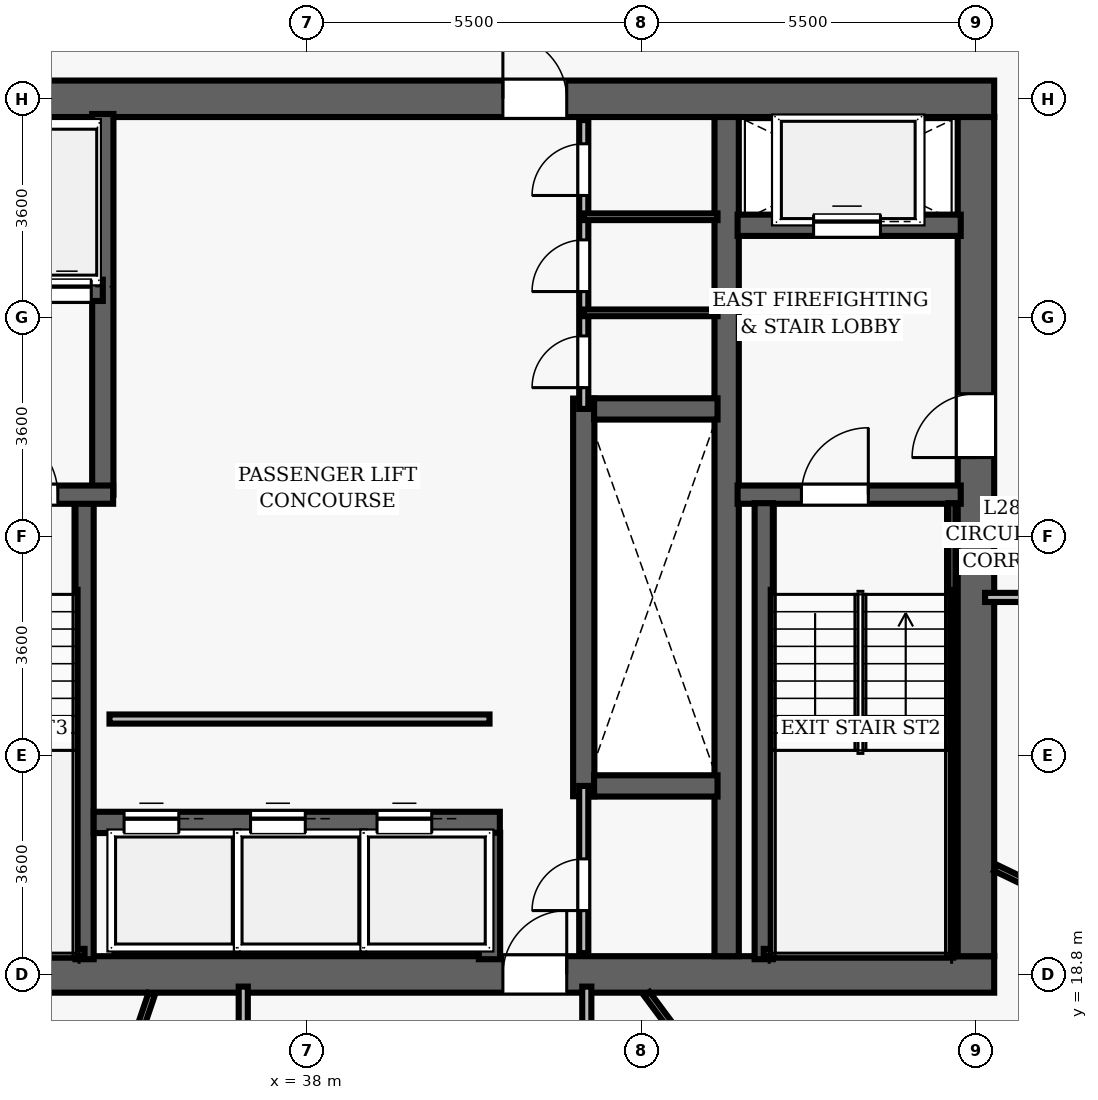
"""IFC4 building model, lengths in metres.
Left out: names, types, materials, properties, quantities, classifications, styles, units other than length and angle.
Written with IfcOpenShell. Run it as: python <this file> out.ifc"""

import sys

from ifc_helpers import new_model, si_unit, direction, frame, frame_2d, origin, place, context, subcontext, project, spatial, rectangle, extrude, element, fill, save


model = new_model("IFC4")
c1 = context("Model", 3, precision=1e-05, world=origin(), true_north=direction((0.0, 1.0)))
c2 = subcontext(c1, "Body", "Model", "MODEL_VIEW")
j1 = project(units=[si_unit("LENGTHUNIT", "METRE"), si_unit("PLANEANGLEUNIT", "RADIAN")], contexts=[c1])
p1 = place(None, origin())
s1 = spatial("IfcSite", under=j1, at=p1, CompositionType="ELEMENT")
p2 = place(p1, origin())
s2 = spatial("IfcBuilding", under=s1, at=p2, CompositionType="ELEMENT")
p3 = place(p2, frame((0.0, 0.0, 116.8)))
s3 = spatial("IfcBuildingStorey", under=s2, at=p3, CompositionType="ELEMENT", Elevation=116.8)
p4 = place(p3, frame((26.7, 18.8, 0.0), z_axis=(0.0, 0.0, 1.0), x_axis=(1.0, 0.0, 0.0)))
e1 = element("IfcWall", 1, at=p4, inside=s3, PredefinedType="SHEAR", context=c2, shape_type="SweptSolid", body=[
    extrude(rectangle(XDim=22.6, YDim=0.6, at=frame_2d((11.3, 0.0))), origin(), (0.0, 0.0, 1.0), 3.5),
])
p5 = place(p4, frame((14.52, 0.0, 0.0)))
e2 = element("IfcOpeningElement", 2, at=p5, cuts=e1, PredefinedType="OPENING", context=c2, shape_type="SweptSolid", body=[
    extrude(rectangle(XDim=1.05, YDim=2.15, at=frame_2d((0.525, 1.075))), frame((0.0, 0.31, 0.0), z_axis=(0.0, -1.0, 0.0), x_axis=(1.0, 0.0, 0.0)), (0.0, 0.0, 1.0), 0.62),
])
p6 = place(p3, frame((26.7, 33.2, 0.0), z_axis=(0.0, 0.0, 1.0), x_axis=(1.0, 0.0, 0.0)))
e3 = element("IfcWall", 3, at=p6, inside=s3, PredefinedType="SHEAR", context=c2, shape_type="SweptSolid", body=[
    extrude(rectangle(XDim=22.6, YDim=0.6, at=frame_2d((11.3, 0.0))), origin(), (0.0, 0.0, 1.0), 3.5),
])
p7 = place(p6, frame((4.62, 0.0, 0.0)))
e4 = element("IfcOpeningElement", 4, at=p7, cuts=e3, PredefinedType="OPENING", context=c2, shape_type="SweptSolid", body=[
    extrude(rectangle(XDim=1.05, YDim=2.15, at=frame_2d((0.525, 1.075))), frame((0.0, 0.31, 0.0), z_axis=(0.0, -1.0, 0.0), x_axis=(1.0, 0.0, 0.0)), (0.0, 0.0, 1.0), 0.62),
])
p8 = place(p6, frame((14.52, 0.0, 0.0)))
e5 = element("IfcOpeningElement", 5, at=p8, cuts=e3, PredefinedType="OPENING", context=c2, shape_type="SweptSolid", body=[
    extrude(rectangle(XDim=1.05, YDim=2.15, at=frame_2d((0.525, 1.075))), frame((0.0, 0.31, 0.0), z_axis=(0.0, -1.0, 0.0), x_axis=(1.0, 0.0, 0.0)), (0.0, 0.0, 1.0), 0.62),
])
p9 = place(p3, frame((49.0, 19.1, 0.0), z_axis=(0.0, 0.0, 1.0), x_axis=(0.0, 1.0, 0.0)))
e6 = element("IfcWall", 6, at=p9, inside=s3, PredefinedType="SHEAR", context=c2, shape_type="SweptSolid", body=[
    extrude(rectangle(XDim=13.8, YDim=0.6, at=frame_2d((6.9, 0.0))), origin(), (0.0, 0.0, 1.0), 3.5),
])
p10 = place(p9, frame((8.2, 0.0, 0.0)))
e7 = element("IfcOpeningElement", 7, at=p10, cuts=e6, PredefinedType="OPENING", context=c2, shape_type="SweptSolid", body=[
    extrude(rectangle(XDim=1.05, YDim=2.15, at=frame_2d((0.525, 1.075))), frame((0.0, 0.31, 0.0), z_axis=(0.0, -1.0, 0.0), x_axis=(1.0, 0.0, 0.0)), (0.0, 0.0, 1.0), 0.62),
])
p11 = place(p3, frame((44.9, 19.1, 0.0), z_axis=(0.0, 0.0, 1.0), x_axis=(0.0, 1.0, 0.0)))
e8 = element("IfcWall", 8, at=p11, inside=s3, PredefinedType="SHEAR", context=c2, shape_type="SweptSolid", body=[
    extrude(rectangle(XDim=13.8, YDim=0.4, at=frame_2d((6.9, 0.0))), origin(), (0.0, 0.0, 1.0), 3.5),
])
p12 = place(p3, frame((45.08, 26.69, 0.0), z_axis=(0.0, 0.0, 1.0), x_axis=(1.0, 0.0, 0.0)))
e9 = element("IfcWall", 9, at=p12, inside=s3, PredefinedType="SHEAR", context=c2, shape_type="SweptSolid", body=[
    extrude(rectangle(XDim=3.67, YDim=0.3, at=frame_2d((1.835, 0.0))), origin(), (0.0, 0.0, 1.0), 3.5),
])
p13 = place(p12, frame((1.05, 0.0, 0.0)))
e10 = element("IfcOpeningElement", 10, at=p13, cuts=e9, PredefinedType="OPENING", context=c2, shape_type="SweptSolid", body=[
    extrude(rectangle(XDim=1.1, YDim=2.15, at=frame_2d((0.55, 1.075))), frame((0.0, 0.16, 0.0), z_axis=(0.0, -1.0, 0.0), x_axis=(1.0, 0.0, 0.0)), (0.0, 0.0, 1.0), 0.32),
])
p14 = place(p3, frame((45.51, 19.05, 0.0), z_axis=(0.0, 0.0, 1.0), x_axis=(0.0, 1.0, 0.0)))
e11 = element("IfcWall", 11, at=p14, inside=s3, PredefinedType="SHEAR", context=c2, shape_type="SweptSolid", body=[
    extrude(rectangle(XDim=7.5, YDim=0.3, at=frame_2d((3.75, 0.0))), origin(), (0.0, 0.0, 1.0), 3.5),
])
p15 = place(p3, frame((48.605, 19.1, 0.0), z_axis=(0.0, 0.0, 1.0), x_axis=(0.0, 1.0, 0.0)))
e12 = element("IfcWall", 12, at=p15, inside=s3, PredefinedType="SHEAR", context=c2, shape_type="SweptSolid", body=[
    extrude(rectangle(XDim=7.45, YDim=0.12, at=frame_2d((3.725, 0.0))), origin(), (0.0, 0.0, 1.0), 3.5),
])
p16 = place(p3, frame((45.51, 19.16, 0.0), z_axis=(0.0, 0.0, 1.0), x_axis=(1.0, 0.0, 0.0)))
e13 = element("IfcWall", 13, at=p16, inside=s3, PredefinedType="SHEAR", context=c2, shape_type="SweptSolid", body=[
    extrude(rectangle(XDim=3.095, YDim=0.12, at=frame_2d((1.547, 0.0))), origin(), (0.0, 0.0, 1.0), 3.5),
])
p17 = place(p3, frame((45.08, 31.12, 0.0), z_axis=(0.0, 0.0, 1.0), x_axis=(1.0, 0.0, 0.0)))
e14 = element("IfcWall", 14, at=p17, inside=s3, PredefinedType="SHEAR", context=c2, shape_type="SweptSolid", body=[
    extrude(rectangle(XDim=3.67, YDim=0.35, at=frame_2d((1.835, 0.0))), origin(), (0.0, 0.0, 1.0), 2.675),
])
p18 = place(p17, frame((1.25, 0.0, 0.0)))
e15 = element("IfcOpeningElement", 15, at=p18, cuts=e14, PredefinedType="OPENING", context=c2, shape_type="SweptSolid", body=[
    extrude(rectangle(XDim=1.1, YDim=2.15, at=frame_2d((0.55, 1.075))), frame((0.0, 0.185, 0.0), z_axis=(0.0, -1.0, 0.0), x_axis=(1.0, 0.0, 0.0)), (0.0, 0.0, 1.0), 0.37),
])
p19 = place(p3, frame((34.34, 19.05, 0.0), z_axis=(0.0, 0.0, 1.0), x_axis=(0.0, 1.0, 0.0)))
e16 = element("IfcWall", 16, at=p19, inside=s3, PredefinedType="SHEAR", context=c2, shape_type="SweptSolid", body=[
    extrude(rectangle(XDim=7.5, YDim=0.3, at=frame_2d((3.75, 0.0))), origin(), (0.0, 0.0, 1.0), 3.5),
])
p20 = place(p3, frame((34.64, 26.69, 0.0), z_axis=(0.0, 0.0, 1.0), x_axis=(0.0, 1.0, 0.0)))
e17 = element("IfcWall", 17, at=p20, inside=s3, PredefinedType="SHEAR", context=c2, shape_type="SweptSolid", body=[
    extrude(rectangle(XDim=6.26, YDim=0.35, at=frame_2d((3.13, 0.0))), origin(), (0.0, 0.0, 1.0), 3.5),
])
p21 = place(p3, frame((31.25, 26.69, 0.0), z_axis=(0.0, 0.0, 1.0), x_axis=(1.0, 0.0, 0.0)))
e18 = element("IfcWall", 18, at=p21, inside=s3, PredefinedType="SHEAR", context=c2, shape_type="SweptSolid", body=[
    extrude(rectangle(XDim=3.56, YDim=0.3, at=frame_2d((1.78, 0.0))), origin(), (0.0, 0.0, 1.0), 3.5),
])
p22 = place(p21, frame((1.55, 0.0, 0.0)))
e19 = element("IfcOpeningElement", 19, at=p22, cuts=e18, PredefinedType="OPENING", context=c2, shape_type="SweptSolid", body=[
    extrude(rectangle(XDim=1.1, YDim=2.15, at=frame_2d((0.55, 1.075))), frame((0.0, 0.16, 0.0), z_axis=(0.0, -1.0, 0.0), x_axis=(1.0, 0.0, 0.0)), (0.0, 0.0, 1.0), 0.32),
])
p23 = place(p3, frame((31.3, 19.16, 0.0), z_axis=(0.0, 0.0, 1.0), x_axis=(1.0, 0.0, 0.0)))
e20 = element("IfcWall", 20, at=p23, inside=s3, PredefinedType="SHEAR", context=c2, shape_type="SweptSolid", body=[
    extrude(rectangle(XDim=3.04, YDim=0.12, at=frame_2d((1.52, 0.0))), origin(), (0.0, 0.0, 1.0), 3.5),
])
p24 = place(p3, frame((32.23, 30.05, 0.0), z_axis=(0.0, 0.0, 1.0), x_axis=(1.0, 0.0, 0.0)))
e21 = element("IfcWall", 21, at=p24, inside=s3, PredefinedType="SHEAR", context=c2, shape_type="SweptSolid", body=[
    extrude(rectangle(XDim=2.41, YDim=0.35, at=frame_2d((1.205, 0.0))), origin(), (0.0, 0.0, 1.0), 2.675),
])
p25 = place(p24, frame((0.42, 0.0, 0.0)))
e22 = element("IfcOpeningElement", 22, at=p25, cuts=e21, PredefinedType="OPENING", context=c2, shape_type="SweptSolid", body=[
    extrude(rectangle(XDim=0.8, YDim=2.15, at=frame_2d((0.4, 1.075))), frame((0.0, 0.185, 0.0), z_axis=(0.0, -1.0, 0.0), x_axis=(1.0, 0.0, 0.0)), (0.0, 0.0, 1.0), 0.37),
])
p26 = place(p24, frame((1.42, 0.0, 0.0)))
e23 = element("IfcOpeningElement", 23, at=p26, cuts=e21, PredefinedType="OPENING", context=c2, shape_type="SweptSolid", body=[
    extrude(rectangle(XDim=0.8, YDim=2.15, at=frame_2d((0.4, 1.075))), frame((0.0, 0.185, 0.0), z_axis=(0.0, -1.0, 0.0), x_axis=(1.0, 0.0, 0.0)), (0.0, 0.0, 1.0), 0.37),
])
p27 = place(p3, frame((42.55, 21.73, 0.0), z_axis=(0.0, 0.0, 1.0), x_axis=(0.0, 1.0, 0.0)))
e24 = element("IfcWall", 24, at=p27, inside=s3, PredefinedType="SHEAR", context=c2, shape_type="SweptSolid", body=[
    extrude(rectangle(XDim=6.54, YDim=0.35, at=frame_2d((3.27, 0.0))), origin(), (0.0, 0.0, 1.0), 2.675),
])
for number, where, z_axis, x_axis in (
    (25, (42.72, 21.9, 0.0), (0.0, 0.0, 1.0), (1.0, 0.0, 0.0)),
    (26, (42.72, 28.1, 0.0), (0.0, 0.0, 1.0), (1.0, 0.0, 0.0)),
):
    element("IfcWall", number, at=place(p3, frame(where, z_axis=z_axis, x_axis=x_axis)), inside=s3, PredefinedType="SHEAR", context=c2, shape_type="SweptSolid", body=[
        extrude(rectangle(XDim=2.03, YDim=0.35, at=frame_2d((1.015, 0.0))), origin(), (0.0, 0.0, 1.0), 2.675),
    ])
p28 = place(p3, frame((34.49, 21.3, 0.0), z_axis=(0.0, 0.0, 1.0), x_axis=(1.0, 0.0, 0.0)))
e27 = element("IfcWall", 27, at=p28, inside=s3, PredefinedType="SHEAR", context=c2, shape_type="SweptSolid", body=[
    extrude(rectangle(XDim=6.68, YDim=0.35, at=frame_2d((3.34, 0.0))), origin(), (0.0, 0.0, 1.0), 2.675),
])
p29 = place(p28, frame((0.5, 0.0, 0.0)))
e28 = element("IfcOpeningElement", 28, at=p29, cuts=e27, PredefinedType="OPENING", context=c2, shape_type="SweptSolid", body=[
    extrude(rectangle(XDim=0.9, YDim=2.15, at=frame_2d((0.45, 1.075))), frame((0.0, 0.185, 0.0), z_axis=(0.0, -1.0, 0.0), x_axis=(1.0, 0.0, 0.0)), (0.0, 0.0, 1.0), 0.37),
])
p30 = place(p28, frame((2.58, 0.0, 0.0)))
e29 = element("IfcOpeningElement", 29, at=p30, cuts=e27, PredefinedType="OPENING", context=c2, shape_type="SweptSolid", body=[
    extrude(rectangle(XDim=0.9, YDim=2.15, at=frame_2d((0.45, 1.075))), frame((0.0, 0.185, 0.0), z_axis=(0.0, -1.0, 0.0), x_axis=(1.0, 0.0, 0.0)), (0.0, 0.0, 1.0), 0.37),
])
p31 = place(p28, frame((4.66, 0.0, 0.0)))
e30 = element("IfcOpeningElement", 30, at=p31, cuts=e27, PredefinedType="OPENING", context=c2, shape_type="SweptSolid", body=[
    extrude(rectangle(XDim=0.9, YDim=2.15, at=frame_2d((0.45, 1.075))), frame((0.0, 0.185, 0.0), z_axis=(0.0, -1.0, 0.0), x_axis=(1.0, 0.0, 0.0)), (0.0, 0.0, 1.0), 0.37),
])
p32 = place(p3, frame((41.0, 19.05, 0.0), z_axis=(0.0, 0.0, 1.0), x_axis=(0.0, 1.0, 0.0)))
e31 = element("IfcWall", 31, at=p32, inside=s3, PredefinedType="SHEAR", context=c2, shape_type="SweptSolid", body=[
    extrude(rectangle(XDim=2.08, YDim=0.35, at=frame_2d((1.04, 0.0))), origin(), (0.0, 0.0, 1.0), 2.675),
])
p33 = place(p3, frame((34.75, 23.0, 0.0), z_axis=(0.0, 0.0, 1.0), x_axis=(1.0, 0.0, 0.0)))
e32 = element("IfcWall", 32, at=p33, inside=s3, PredefinedType="PARTITIONING", context=c2, shape_type="SweptSolid", body=[
    extrude(rectangle(XDim=6.25, YDim=0.15, at=frame_2d((3.125, 0.0))), origin(), (0.0, 0.0, 1.0), 2.675),
])
p34 = place(p3, frame((42.55, 28.1, 0.0), z_axis=(0.0, 0.0, 1.0), x_axis=(0.0, 1.0, 0.0)))
e33 = element("IfcWall", 33, at=p34, inside=s3, PredefinedType="PARTITIONING", context=c2, shape_type="SweptSolid", body=[
    extrude(rectangle(XDim=4.75, YDim=0.15, at=frame_2d((2.375, 0.0))), origin(), (0.0, 0.0, 1.0), 2.675),
])
p35 = place(p34, frame((0.35, 0.0, 0.0)))
e34 = element("IfcOpeningElement", 34, at=p35, cuts=e33, PredefinedType="OPENING", context=c2, shape_type="SweptSolid", body=[
    extrude(rectangle(XDim=0.85, YDim=2.1, at=frame_2d((0.425, 1.05))), frame((0.0, 0.085, 0.0), z_axis=(0.0, -1.0, 0.0), x_axis=(1.0, 0.0, 0.0)), (0.0, 0.0, 1.0), 0.17),
])
p36 = place(p34, frame((1.93, 0.0, 0.0)))
e35 = element("IfcOpeningElement", 35, at=p36, cuts=e33, PredefinedType="OPENING", context=c2, shape_type="SweptSolid", body=[
    extrude(rectangle(XDim=0.85, YDim=2.1, at=frame_2d((0.425, 1.05))), frame((0.0, 0.085, 0.0), z_axis=(0.0, -1.0, 0.0), x_axis=(1.0, 0.0, 0.0)), (0.0, 0.0, 1.0), 0.17),
])
p37 = place(p34, frame((3.51, 0.0, 0.0)))
e36 = element("IfcOpeningElement", 36, at=p37, cuts=e33, PredefinedType="OPENING", context=c2, shape_type="SweptSolid", body=[
    extrude(rectangle(XDim=0.85, YDim=2.1, at=frame_2d((0.425, 1.05))), frame((0.0, 0.085, 0.0), z_axis=(0.0, -1.0, 0.0), x_axis=(1.0, 0.0, 0.0)), (0.0, 0.0, 1.0), 0.17),
])
for number, where, z_axis, x_axis in (
    (37, (42.55, 29.68, 0.0), (0.0, 0.0, 1.0), (1.0, 0.0, 0.0)),
    (38, (42.55, 31.26, 0.0), (0.0, 0.0, 1.0), (1.0, 0.0, 0.0)),
):
    element("IfcWall", number, at=place(p3, frame(where, z_axis=z_axis, x_axis=x_axis)), inside=s3, PredefinedType="PARTITIONING", context=c2, shape_type="SweptSolid", body=[
        extrude(rectangle(XDim=2.2, YDim=0.11, at=frame_2d((1.1, 0.0))), origin(), (0.0, 0.0, 1.0), 2.675),
    ])
p38 = place(p3, frame((42.55, 19.15, 0.0), z_axis=(0.0, 0.0, 1.0), x_axis=(0.0, 1.0, 0.0)))
e39 = element("IfcWall", 39, at=p38, inside=s3, PredefinedType="PARTITIONING", context=c2, shape_type="SweptSolid", body=[
    extrude(rectangle(XDim=2.75, YDim=0.15, at=frame_2d((1.375, 0.0))), origin(), (0.0, 0.0, 1.0), 2.675),
])
p39 = place(p38, frame((0.7, 0.0, 0.0)))
e40 = element("IfcOpeningElement", 40, at=p39, cuts=e39, PredefinedType="OPENING", context=c2, shape_type="SweptSolid", body=[
    extrude(rectangle(XDim=0.85, YDim=2.1, at=frame_2d((0.425, 1.05))), frame((0.0, 0.085, 0.0), z_axis=(0.0, -1.0, 0.0), x_axis=(1.0, 0.0, 0.0)), (0.0, 0.0, 1.0), 0.17),
])
p40 = place(p3, frame((49.15, 25.0, 0.0), z_axis=(0.0, 0.0, 1.0), x_axis=(1.0, 0.0, 0.0)))
e41 = element("IfcWall", 41, at=p40, inside=s3, PredefinedType="PARTITIONING", context=c2, shape_type="SweptSolid", body=[
    extrude(rectangle(XDim=12.35, YDim=0.15, at=frame_2d((6.175, 0.0))), origin(), (0.0, 0.0, 1.0), 2.675),
])
p41 = place(p40, frame((2.613, 0.0, 0.0)))
e42 = element("IfcOpeningElement", 42, at=p41, cuts=e41, PredefinedType="OPENING", context=c2, shape_type="SweptSolid", body=[
    extrude(rectangle(XDim=0.95, YDim=2.15, at=frame_2d((0.475, 1.075))), frame((0.0, 0.085, 0.0), z_axis=(0.0, -1.0, 0.0), x_axis=(1.0, 0.0, 0.0)), (0.0, 0.0, 1.0), 0.17),
])
p42 = place(p3, frame((36.95, 11.2, 0.0), z_axis=(0.0, 0.0, 1.0), x_axis=(0.0, 1.0, 0.0)))
e43 = element("IfcWall", 43, at=p42, inside=s3, PredefinedType="PARTITIONING", context=c2, shape_type="SweptSolid", body=[
    extrude(rectangle(XDim=7.4, YDim=0.15, at=frame_2d((3.7, 0.0))), origin(), (0.0, 0.0, 1.0), 2.675),
])
p43 = place(p42, frame((5.075, 0.0, 0.0)))
e44 = element("IfcOpeningElement", 44, at=p43, cuts=e43, PredefinedType="OPENING", context=c2, shape_type="SweptSolid", body=[
    extrude(rectangle(XDim=0.95, YDim=2.15, at=frame_2d((0.475, 1.075))), frame((0.0, 0.085, 0.0), z_axis=(0.0, -1.0, 0.0), x_axis=(1.0, 0.0, 0.0)), (0.0, 0.0, 1.0), 0.17),
])
p44 = place(p3, frame((42.6, 16.65, 0.0), z_axis=(0.0, 0.0, 1.0), x_axis=(0.0, 1.0, 0.0)))
e45 = element("IfcWall", 45, at=p44, inside=s3, PredefinedType="PARTITIONING", context=c2, shape_type="SweptSolid", body=[
    extrude(rectangle(XDim=1.95, YDim=0.15, at=frame_2d((0.975, 0.0))), origin(), (0.0, 0.0, 1.0), 2.675),
])
p45 = place(p3, frame((35.445, 18.48, 0.0), z_axis=(0.0, 0.0, 1.0), x_axis=(-0.321754532436, -0.946823120153, 0.0)))
e46 = element("IfcWall", 46, at=p45, inside=s3, PredefinedType="PARTITIONING", context=c2, shape_type="SweptSolid", body=[
    extrude(rectangle(XDim=14.974, YDim=0.11, at=frame_2d((7.487, 0.0))), origin(), (0.0, 0.0, 1.0), 2.675),
])
p46 = place(p3, frame((43.588, 18.48, 0.0), z_axis=(0.0, 0.0, 1.0), x_axis=(0.596440621001, -0.802657203057, 0.0)))
e47 = element("IfcWall", 47, at=p46, inside=s3, PredefinedType="PARTITIONING", context=c2, shape_type="SweptSolid", body=[
    extrude(rectangle(XDim=15.841, YDim=0.11, at=frame_2d((7.92, 0.0))), origin(), (0.0, 0.0, 1.0), 2.675),
])
p47 = place(p3, frame((49.32, 20.554, 0.0), z_axis=(0.0, 0.0, 1.0), x_axis=(0.901134026531, -0.433540616583, 0.0)))
e48 = element("IfcWall", 48, at=p47, inside=s3, PredefinedType="PARTITIONING", context=c2, shape_type="SweptSolid", body=[
    extrude(rectangle(XDim=15.536, YDim=0.11, at=frame_2d((7.768, 0.0))), origin(), (0.0, 0.0, 1.0), 2.675),
])
p48 = place(p13, origin())
e49 = element("IfcDoor", 49, at=p48, inside=s3, OperationType="SINGLE_SWING_RIGHT", PredefinedType="DOOR", context=c2, shape_type="SweptSolid", body=[
    extrude(rectangle(XDim=1.1, YDim=2.15, at=frame_2d((0.55, 1.075))), frame((0.0, 0.025, 0.0), z_axis=(0.0, -1.0, 0.0), x_axis=(1.0, 0.0, 0.0)), (0.0, 0.0, 1.0), 0.05),
])
fill(e10, e49)
p49 = place(p10, origin())
e50 = element("IfcDoor", 50, at=p49, inside=s3, OperationType="SINGLE_SWING_LEFT", PredefinedType="DOOR", context=c2, shape_type="SweptSolid", body=[
    extrude(rectangle(XDim=1.05, YDim=2.15, at=frame_2d((0.525, 1.075))), frame((0.0, 0.025, 0.0), z_axis=(0.0, -1.0, 0.0), x_axis=(1.0, 0.0, 0.0)), (0.0, 0.0, 1.0), 0.05),
])
fill(e7, e50)
p50 = place(p22, origin())
e51 = element("IfcDoor", 51, at=p50, inside=s3, OperationType="SINGLE_SWING_LEFT", PredefinedType="DOOR", context=c2, shape_type="SweptSolid", body=[
    extrude(rectangle(XDim=1.1, YDim=2.15, at=frame_2d((0.55, 1.075))), frame((0.0, 0.025, 0.0), z_axis=(0.0, -1.0, 0.0), x_axis=(1.0, 0.0, 0.0)), (0.0, 0.0, 1.0), 0.05),
])
fill(e19, e51)
p51 = place(p8, origin())
e52 = element("IfcDoor", 52, at=p51, inside=s3, OperationType="SINGLE_SWING_LEFT", PredefinedType="DOOR", context=c2, shape_type="SweptSolid", body=[
    extrude(rectangle(XDim=1.05, YDim=2.15, at=frame_2d((0.525, 1.075))), frame((0.0, 0.025, 0.0), z_axis=(0.0, -1.0, 0.0), x_axis=(1.0, 0.0, 0.0)), (0.0, 0.0, 1.0), 0.05),
])
fill(e5, e52)
p52 = place(p5, origin())
e53 = element("IfcDoor", 53, at=p52, inside=s3, OperationType="SINGLE_SWING_RIGHT", PredefinedType="DOOR", context=c2, shape_type="SweptSolid", body=[
    extrude(rectangle(XDim=1.05, YDim=2.15, at=frame_2d((0.525, 1.075))), frame((0.0, 0.025, 0.0), z_axis=(0.0, -1.0, 0.0), x_axis=(1.0, 0.0, 0.0)), (0.0, 0.0, 1.0), 0.05),
])
fill(e2, e53)
p53 = place(p35, origin())
e54 = element("IfcDoor", 54, at=p53, inside=s3, OperationType="SINGLE_SWING_LEFT", PredefinedType="DOOR", context=c2, shape_type="SweptSolid", body=[
    extrude(rectangle(XDim=0.85, YDim=2.1, at=frame_2d((0.425, 1.05))), frame((0.0, 0.025, 0.0), z_axis=(0.0, -1.0, 0.0), x_axis=(1.0, 0.0, 0.0)), (0.0, 0.0, 1.0), 0.05),
])
fill(e34, e54)
p54 = place(p36, origin())
e55 = element("IfcDoor", 55, at=p54, inside=s3, OperationType="SINGLE_SWING_LEFT", PredefinedType="DOOR", context=c2, shape_type="SweptSolid", body=[
    extrude(rectangle(XDim=0.85, YDim=2.1, at=frame_2d((0.425, 1.05))), frame((0.0, 0.025, 0.0), z_axis=(0.0, -1.0, 0.0), x_axis=(1.0, 0.0, 0.0)), (0.0, 0.0, 1.0), 0.05),
])
fill(e35, e55)
p55 = place(p37, origin())
e56 = element("IfcDoor", 56, at=p55, inside=s3, OperationType="SINGLE_SWING_LEFT", PredefinedType="DOOR", context=c2, shape_type="SweptSolid", body=[
    extrude(rectangle(XDim=0.85, YDim=2.1, at=frame_2d((0.425, 1.05))), frame((0.0, 0.025, 0.0), z_axis=(0.0, -1.0, 0.0), x_axis=(1.0, 0.0, 0.0)), (0.0, 0.0, 1.0), 0.05),
])
fill(e36, e56)
p56 = place(p39, origin())
e57 = element("IfcDoor", 57, at=p56, inside=s3, OperationType="SINGLE_SWING_LEFT", PredefinedType="DOOR", context=c2, shape_type="SweptSolid", body=[
    extrude(rectangle(XDim=0.85, YDim=2.1, at=frame_2d((0.425, 1.05))), frame((0.0, 0.025, 0.0), z_axis=(0.0, -1.0, 0.0), x_axis=(1.0, 0.0, 0.0)), (0.0, 0.0, 1.0), 0.05),
])
fill(e40, e57)
p57 = place(p29, origin())
e58 = element("IfcDoor", 58, at=p57, inside=s3, OperationType="SLIDING_TO_LEFT", PredefinedType="DOOR", context=c2, shape_type="SweptSolid", body=[
    extrude(rectangle(XDim=0.9, YDim=2.15, at=frame_2d((0.45, 1.075))), frame((0.0, 0.025, 0.0), z_axis=(0.0, -1.0, 0.0), x_axis=(1.0, 0.0, 0.0)), (0.0, 0.0, 1.0), 0.05),
])
fill(e28, e58)
p58 = place(p30, origin())
e59 = element("IfcDoor", 59, at=p58, inside=s3, OperationType="SLIDING_TO_LEFT", PredefinedType="DOOR", context=c2, shape_type="SweptSolid", body=[
    extrude(rectangle(XDim=0.9, YDim=2.15, at=frame_2d((0.45, 1.075))), frame((0.0, 0.025, 0.0), z_axis=(0.0, -1.0, 0.0), x_axis=(1.0, 0.0, 0.0)), (0.0, 0.0, 1.0), 0.05),
])
fill(e29, e59)
p59 = place(p31, origin())
e60 = element("IfcDoor", 60, at=p59, inside=s3, OperationType="SLIDING_TO_LEFT", PredefinedType="DOOR", context=c2, shape_type="SweptSolid", body=[
    extrude(rectangle(XDim=0.9, YDim=2.15, at=frame_2d((0.45, 1.075))), frame((0.0, 0.025, 0.0), z_axis=(0.0, -1.0, 0.0), x_axis=(1.0, 0.0, 0.0)), (0.0, 0.0, 1.0), 0.05),
])
fill(e30, e60)
p60 = place(p18, origin())
e61 = element("IfcDoor", 61, at=p60, inside=s3, OperationType="SLIDING_TO_LEFT", PredefinedType="DOOR", context=c2, shape_type="SweptSolid", body=[
    extrude(rectangle(XDim=1.1, YDim=2.15, at=frame_2d((0.55, 1.075))), frame((0.0, 0.025, 0.0), z_axis=(0.0, -1.0, 0.0), x_axis=(1.0, 0.0, 0.0)), (0.0, 0.0, 1.0), 0.05),
])
fill(e15, e61)
p61 = place(p26, origin())
e62 = element("IfcDoor", 62, at=p61, inside=s3, OperationType="SLIDING_TO_LEFT", PredefinedType="DOOR", context=c2, shape_type="SweptSolid", body=[
    extrude(rectangle(XDim=0.8, YDim=2.15, at=frame_2d((0.4, 1.075))), frame((0.0, 0.025, 0.0), z_axis=(0.0, -1.0, 0.0), x_axis=(1.0, 0.0, 0.0)), (0.0, 0.0, 1.0), 0.05),
])
fill(e23, e62)
save(model, sys.argv[1])
